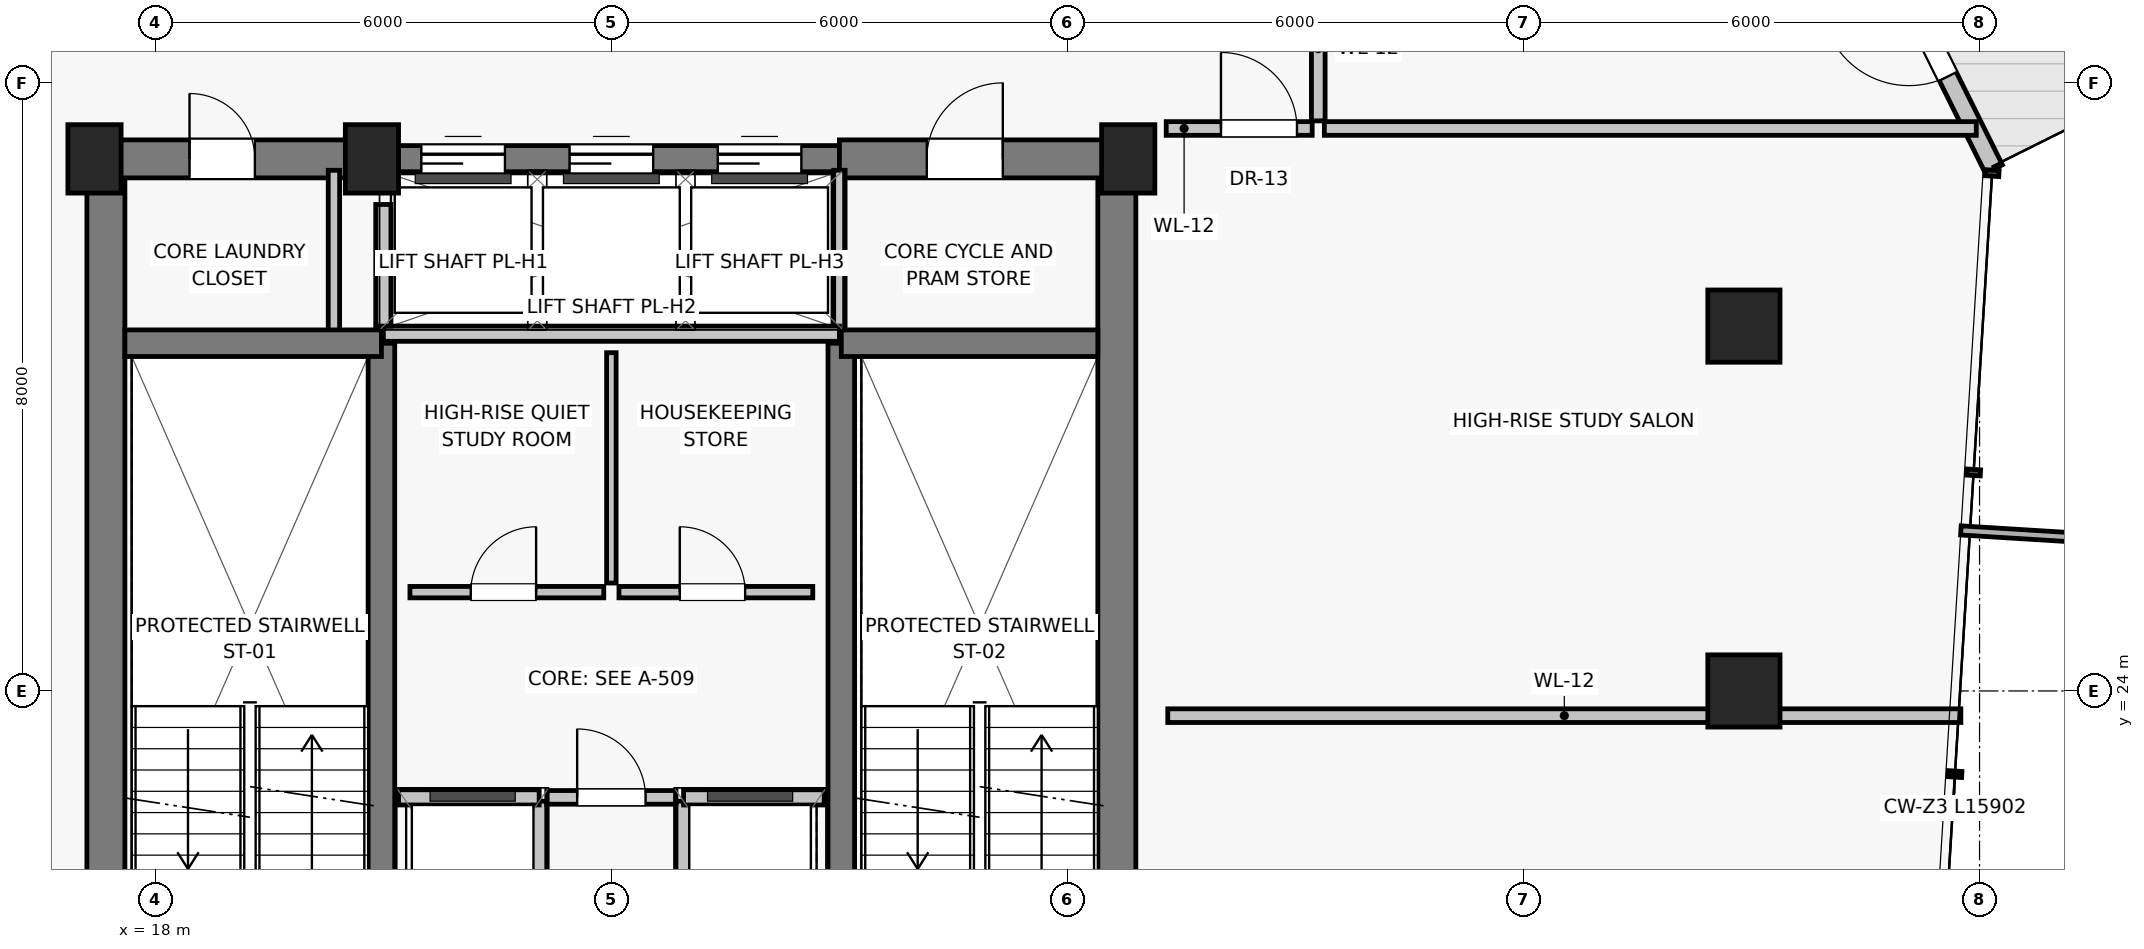
"""IFC4 building model, lengths in metres.
Left out: names, types, materials, properties, quantities, classifications, styles, units other than length and angle.
Written with IfcOpenShell. Run it as: python <this file> out.ifc"""

import sys

from ifc_helpers import new_model, si_unit, direction, frame, frame_2d, origin, origin_2d, place, context, subcontext, project, spatial, rectangle, extrude, source, transform, mapped, element, fill, save


model = new_model("IFC4")
c1 = context("Model", 3, precision=1e-05, world=origin(), true_north=direction((0.0, 1.0)))
c2 = subcontext(c1, "Body", "Model", "MODEL_VIEW")
j1 = project(units=[si_unit("LENGTHUNIT", "METRE"), si_unit("PLANEANGLEUNIT", "RADIAN")], contexts=[c1])
p1 = place(None, origin())
s1 = spatial("IfcSite", under=j1, at=p1, CompositionType="ELEMENT")
p2 = place(p1, origin())
s2 = spatial("IfcBuilding", under=s1, at=p2, CompositionType="ELEMENT")
p3 = place(p2, frame((0.0, 0.0, 218.9)))
s3 = spatial("IfcBuildingStorey", under=s2, at=p3, CompositionType="ELEMENT", Elevation=218.9)
for number, where, z_axis, x_axis in (
    (1, (17.2, 31.0, 0.0), (0.0, 0.0, 1.0), (1.0, 0.0, 0.0)),
    (2, (20.85, 31.0, 0.0), (0.0, 0.0, 1.0), (1.0, 0.0, 0.0)),
    (3, (30.8, 31.0, 0.0), (0.0, 0.0, 1.0), (1.0, 0.0, 0.0)),
):
    element("IfcColumn", number, at=place(p3, frame(where, z_axis=z_axis, x_axis=x_axis)), inside=s3, PredefinedType="PILASTER", context=c2, shape_type="SweptSolid", body=[
        extrude(rectangle(XDim=0.7, YDim=0.9, at=origin_2d()), origin(), (0.0, 0.0, 1.0), 3.25),
    ])
for number, where, z_axis, x_axis in (
    (4, (38.9, 24.0, 0.0), (0.0, 0.0, 1.0), (1.0, 0.0, 0.0)),
    (5, (38.9, 28.8, 0.0), (0.0, 0.0, 1.0), (1.0, 0.0, 0.0)),
):
    element("IfcColumn", number, at=place(p3, frame(where, z_axis=z_axis, x_axis=x_axis)), inside=s3, PredefinedType="COLUMN", context=c2, shape_type="SweptSolid", body=[
        extrude(rectangle(XDim=0.95, YDim=0.95, at=origin_2d()), origin(), (0.0, 0.0, 1.0), 3.25),
    ])
p4 = place(p3, frame((42.189, 30.867, 0.0), z_axis=(0.0, 0.0, 1.0), x_axis=(-0.445591168043, 0.895236567038, 0.0)))
e6 = element("IfcWall", 6, at=p4, inside=s3, PredefinedType="SOLIDWALL", context=c2, shape_type="SweptSolid", body=[
    extrude(rectangle(XDim=3.914, YDim=0.25, at=frame_2d((1.957, 0.0))), origin(), (0.0, 0.0, 1.0), 3.015),
])
p5 = place(p4, frame((1.36, 0.0, 0.0)))
e7 = element("IfcOpeningElement", 7, at=p5, cuts=e6, PredefinedType="OPENING", context=c2, shape_type="SweptSolid", body=[
    extrude(rectangle(XDim=1.15, YDim=2.25, at=frame_2d((0.575, 1.125))), frame((0.0, 0.135, 0.0), z_axis=(0.0, -1.0, 0.0), x_axis=(1.0, 0.0, 0.0)), (0.0, 0.0, 1.0), 0.27),
])
for number, where, z_axis, x_axis in (
    (8, (17.35, 16.8, 0.0), (0.0, 0.0, 1.0), (0.0, 1.0, 0.0)),
    (9, (30.65, 16.8, 0.0), (0.0, 0.0, 1.0), (0.0, 1.0, 0.0)),
):
    element("IfcWall", number, at=place(p3, frame(where, z_axis=z_axis, x_axis=x_axis)), inside=s3, PredefinedType="SHEAR", context=c2, shape_type="SweptSolid", body=[
        extrude(rectangle(XDim=14.2, YDim=0.5, at=frame_2d((7.1, 0.0))), origin(), (0.0, 0.0, 1.0), 3.015),
    ])
p6 = place(p3, frame((17.2, 31.0, 0.0), z_axis=(0.0, 0.0, 1.0), x_axis=(1.0, 0.0, 0.0)))
e10 = element("IfcWall", 10, at=p6, inside=s3, PredefinedType="SHEAR", context=c2, shape_type="SweptSolid", body=[
    extrude(rectangle(XDim=3.8, YDim=0.5, at=frame_2d((1.9, 0.0))), origin(), (0.0, 0.0, 1.0), 3.015),
])
p7 = place(p6, frame((1.25, 0.0, 0.0)))
e11 = element("IfcOpeningElement", 11, at=p7, cuts=e10, PredefinedType="OPENING", context=c2, shape_type="SweptSolid", body=[
    extrude(rectangle(XDim=0.86, YDim=2.01, at=frame_2d((0.43, 1.005))), frame((0.0, 0.26, 0.0), z_axis=(0.0, -1.0, 0.0), x_axis=(1.0, 0.0, 0.0)), (0.0, 0.0, 1.0), 0.52),
])
p8 = place(p3, frame((21.0, 31.0, 0.0), z_axis=(0.0, 0.0, 1.0), x_axis=(1.0, 0.0, 0.0)))
e12 = element("IfcWall", 12, at=p8, inside=s3, PredefinedType="SHEAR", context=c2, shape_type="SweptSolid", body=[
    extrude(rectangle(XDim=6.0, YDim=0.35, at=frame_2d((3.0, 0.0))), origin(), (0.0, 0.0, 1.0), 3.015),
])
p9 = place(p8, frame((0.5, 0.0, 0.0)))
e13 = element("IfcOpeningElement", 13, at=p9, cuts=e12, PredefinedType="OPENING", context=c2, shape_type="SweptSolid", body=[
    extrude(rectangle(XDim=1.1, YDim=2.08, at=frame_2d((0.55, 1.04))), frame((0.0, 0.185, 0.0), z_axis=(0.0, -1.0, 0.0), x_axis=(1.0, 0.0, 0.0)), (0.0, 0.0, 1.0), 0.37),
])
p10 = place(p8, frame((2.45, 0.0, 0.0)))
e14 = element("IfcOpeningElement", 14, at=p10, cuts=e12, PredefinedType="OPENING", context=c2, shape_type="SweptSolid", body=[
    extrude(rectangle(XDim=1.1, YDim=2.08, at=frame_2d((0.55, 1.04))), frame((0.0, 0.185, 0.0), z_axis=(0.0, -1.0, 0.0), x_axis=(1.0, 0.0, 0.0)), (0.0, 0.0, 1.0), 0.37),
])
p11 = place(p8, frame((4.4, 0.0, 0.0)))
e15 = element("IfcOpeningElement", 15, at=p11, cuts=e12, PredefinedType="OPENING", context=c2, shape_type="SweptSolid", body=[
    extrude(rectangle(XDim=1.1, YDim=2.08, at=frame_2d((0.55, 1.04))), frame((0.0, 0.185, 0.0), z_axis=(0.0, -1.0, 0.0), x_axis=(1.0, 0.0, 0.0)), (0.0, 0.0, 1.0), 0.37),
])
p12 = place(p3, frame((27.0, 31.0, 0.0), z_axis=(0.0, 0.0, 1.0), x_axis=(1.0, 0.0, 0.0)))
e16 = element("IfcWall", 16, at=p12, inside=s3, PredefinedType="SHEAR", context=c2, shape_type="SweptSolid", body=[
    extrude(rectangle(XDim=3.8, YDim=0.5, at=frame_2d((1.9, 0.0))), origin(), (0.0, 0.0, 1.0), 3.015),
])
p13 = place(p12, frame((1.15, 0.0, 0.0)))
e17 = element("IfcOpeningElement", 17, at=p13, cuts=e16, PredefinedType="OPENING", context=c2, shape_type="SweptSolid", body=[
    extrude(rectangle(XDim=1.0, YDim=2.01, at=frame_2d((0.5, 1.005))), frame((0.0, 0.26, 0.0), z_axis=(0.0, -1.0, 0.0), x_axis=(1.0, 0.0, 0.0)), (0.0, 0.0, 1.0), 0.52),
])
for number, where, z_axis, x_axis in (
    (18, (20.35, 28.65, 0.0), (0.0, 0.0, 1.0), (0.0, 1.0, 0.0)),
    (19, (27.0, 28.65, 0.0), (0.0, 0.0, 1.0), (0.0, 1.0, 0.0)),
):
    element("IfcWall", number, at=place(p3, frame(where, z_axis=z_axis, x_axis=x_axis)), inside=s3, PredefinedType="PARTITIONING", context=c2, shape_type="SweptSolid", body=[
        extrude(rectangle(XDim=2.2, YDim=0.15, at=frame_2d((1.1, 0.0))), origin(), (0.0, 0.0, 1.0), 3.015),
    ])
for number, where, z_axis, x_axis in (
    (20, (20.975, 19.8, 0.0), (0.0, 0.0, 1.0), (0.0, 1.0, 0.0)),
    (21, (27.025, 19.8, 0.0), (0.0, 0.0, 1.0), (0.0, 1.0, 0.0)),
):
    element("IfcWall", number, at=place(p3, frame(where, z_axis=z_axis, x_axis=x_axis)), inside=s3, PredefinedType="SHEAR", context=c2, shape_type="SweptSolid", body=[
        extrude(rectangle(XDim=8.775, YDim=0.35, at=frame_2d((4.387, 0.0))), origin(), (0.0, 0.0, 1.0), 3.015),
    ])
for number, where, z_axis, x_axis in (
    (22, (17.6, 28.575, 0.0), (0.0, 0.0, 1.0), (1.0, 0.0, 0.0)),
    (23, (27.025, 28.575, 0.0), (0.0, 0.0, 1.0), (1.0, 0.0, 0.0)),
):
    element("IfcWall", number, at=place(p3, frame(where, z_axis=z_axis, x_axis=x_axis)), inside=s3, PredefinedType="SHEAR", context=c2, shape_type="SweptSolid", body=[
        extrude(rectangle(XDim=3.375, YDim=0.35, at=frame_2d((1.688, 0.0))), origin(), (0.0, 0.0, 1.0), 3.015),
    ])
for number, where, z_axis, x_axis in (
    (24, (23.05, 16.95, 0.0), (0.0, 0.0, 1.0), (0.0, 1.0, 0.0)),
    (25, (24.95, 16.95, 0.0), (0.0, 0.0, 1.0), (0.0, 1.0, 0.0)),
):
    element("IfcWall", number, at=place(p3, frame(where, z_axis=z_axis, x_axis=x_axis)), inside=s3, PredefinedType="SOLIDWALL", context=c2, shape_type="SweptSolid", body=[
        extrude(rectangle(XDim=5.6, YDim=0.2, at=frame_2d((2.8, 0.0))), origin(), (0.0, 0.0, 1.0), 3.015),
    ])
for number, where, z_axis, x_axis in (
    (26, (21.2, 22.6, 0.0), (0.0, 0.0, 1.0), (1.0, 0.0, 0.0)),
    (27, (24.95, 22.6, 0.0), (0.0, 0.0, 1.0), (1.0, 0.0, 0.0)),
):
    element("IfcWall", number, at=place(p3, frame(where, z_axis=z_axis, x_axis=x_axis)), inside=s3, PredefinedType="SOLIDWALL", context=c2, shape_type="SweptSolid", body=[
        extrude(rectangle(XDim=1.85, YDim=0.2, at=frame_2d((0.925, 0.0))), origin(), (0.0, 0.0, 1.0), 3.015),
    ])
p14 = place(p3, frame((21.0, 28.7, 0.0), z_axis=(0.0, 0.0, 1.0), x_axis=(1.0, 0.0, 0.0)))
e28 = element("IfcWall", 28, at=p14, inside=s3, PredefinedType="SOLIDWALL", context=c2, shape_type="SweptSolid", body=[
    extrude(rectangle(XDim=6.0, YDim=0.2, at=frame_2d((3.0, 0.0))), origin(), (0.0, 0.0, 1.0), 3.015),
])
p15 = place(p3, frame((21.0, 28.8, 0.0), z_axis=(0.0, 0.0, 1.0), x_axis=(0.0, 1.0, 0.0)))
e29 = element("IfcWall", 29, at=p15, inside=s3, PredefinedType="SOLIDWALL", context=c2, shape_type="SweptSolid", body=[
    extrude(rectangle(XDim=1.6, YDim=0.2, at=frame_2d((0.8, 0.0))), origin(), (0.0, 0.0, 1.0), 3.015),
])
p16 = place(p3, frame((23.15, 22.6, 0.0), z_axis=(0.0, 0.0, 1.0), x_axis=(1.0, 0.0, 0.0)))
e30 = element("IfcWall", 30, at=p16, inside=s3, PredefinedType="PARTITIONING", context=c2, shape_type="SweptSolid", body=[
    extrude(rectangle(XDim=1.7, YDim=0.18, at=frame_2d((0.85, 0.0))), origin(), (0.0, 0.0, 1.0), 3.015),
])
p17 = place(p16, frame((0.4, 0.0, 0.0)))
e31 = element("IfcOpeningElement", 31, at=p17, cuts=e30, PredefinedType="OPENING", context=c2, shape_type="SweptSolid", body=[
    extrude(rectangle(XDim=0.9, YDim=2.01, at=frame_2d((0.45, 1.005))), frame((0.0, 0.1, 0.0), z_axis=(0.0, -1.0, 0.0), x_axis=(1.0, 0.0, 0.0)), (0.0, 0.0, 1.0), 0.2),
])
p18 = place(p3, frame((21.35, 25.3, 0.0), z_axis=(0.0, 0.0, 1.0), x_axis=(1.0, 0.0, 0.0)))
e32 = element("IfcWall", 32, at=p18, inside=s3, PredefinedType="PARTITIONING", context=c2, shape_type="SweptSolid", body=[
    extrude(rectangle(XDim=2.55, YDim=0.15, at=frame_2d((1.275, 0.0))), origin(), (0.0, 0.0, 1.0), 3.015),
])
p19 = place(p18, frame((0.8, 0.0, 0.0)))
e33 = element("IfcOpeningElement", 33, at=p19, cuts=e32, PredefinedType="OPENING", context=c2, shape_type="SweptSolid", body=[
    extrude(rectangle(XDim=0.86, YDim=2.01, at=frame_2d((0.43, 1.005))), frame((0.0, 0.085, 0.0), z_axis=(0.0, -1.0, 0.0), x_axis=(1.0, 0.0, 0.0)), (0.0, 0.0, 1.0), 0.17),
])
p20 = place(p3, frame((24.1, 25.3, 0.0), z_axis=(0.0, 0.0, 1.0), x_axis=(1.0, 0.0, 0.0)))
e34 = element("IfcWall", 34, at=p20, inside=s3, PredefinedType="PARTITIONING", context=c2, shape_type="SweptSolid", body=[
    extrude(rectangle(XDim=2.55, YDim=0.15, at=frame_2d((1.275, 0.0))), origin(), (0.0, 0.0, 1.0), 3.015),
])
p21 = place(p20, frame((0.8, 0.0, 0.0)))
e35 = element("IfcOpeningElement", 35, at=p21, cuts=e34, PredefinedType="OPENING", context=c2, shape_type="SweptSolid", body=[
    extrude(rectangle(XDim=0.86, YDim=2.01, at=frame_2d((0.43, 1.005))), frame((0.0, 0.085, 0.0), z_axis=(0.0, -1.0, 0.0), x_axis=(1.0, 0.0, 0.0)), (0.0, 0.0, 1.0), 0.17),
])
p22 = place(p3, frame((24.0, 25.42, 0.0), z_axis=(0.0, 0.0, 1.0), x_axis=(0.0, 1.0, 0.0)))
e36 = element("IfcWall", 36, at=p22, inside=s3, PredefinedType="PARTITIONING", context=c2, shape_type="SweptSolid", body=[
    extrude(rectangle(XDim=3.03, YDim=0.125, at=frame_2d((1.515, 0.0))), origin(), (0.0, 0.0, 1.0), 3.015),
])
p23 = place(p3, frame((31.32, 23.675, 0.0), z_axis=(0.0, 0.0, 1.0), x_axis=(1.0, 0.0, 0.0)))
e37 = element("IfcWall", 37, at=p23, inside=s3, PredefinedType="PARTITIONING", context=c2, shape_type="SweptSolid", body=[
    extrude(rectangle(XDim=10.434, YDim=0.18, at=frame_2d((5.217, 0.0))), origin(), (0.0, 0.0, 1.0), 3.015),
])
p24 = place(p3, frame((33.3, 31.5, 0.0), z_axis=(0.0, 0.0, 1.0), x_axis=(0.0, 1.0, 0.0)))
e38 = element("IfcWall", 38, at=p24, inside=s3, PredefinedType="PARTITIONING", context=c2, shape_type="SweptSolid", body=[
    extrude(rectangle(XDim=1.9, YDim=0.18, at=frame_2d((0.95, 0.0))), origin(), (0.0, 0.0, 1.0), 3.015),
])
p25 = place(p3, frame((31.3, 31.4, 0.0), z_axis=(0.0, 0.0, 1.0), x_axis=(1.0, 0.0, 0.0)))
e39 = element("IfcWall", 39, at=p25, inside=s3, PredefinedType="PARTITIONING", context=c2, shape_type="SweptSolid", body=[
    extrude(rectangle(XDim=1.92, YDim=0.18, at=frame_2d((0.96, 0.0))), origin(), (0.0, 0.0, 1.0), 3.015),
])
p26 = place(p25, frame((0.72, 0.0, 0.0)))
e40 = element("IfcOpeningElement", 40, at=p26, cuts=e39, PredefinedType="OPENING", context=c2, shape_type="SweptSolid", body=[
    extrude(rectangle(XDim=1.0, YDim=2.01, at=frame_2d((0.5, 1.005))), frame((0.0, 0.1, 0.0), z_axis=(0.0, -1.0, 0.0), x_axis=(1.0, 0.0, 0.0)), (0.0, 0.0, 1.0), 0.2),
])
p27 = place(p3, frame((33.38, 31.4, 0.0), z_axis=(0.0, 0.0, 1.0), x_axis=(1.0, 0.0, 0.0)))
e41 = element("IfcWall", 41, at=p27, inside=s3, PredefinedType="PARTITIONING", context=c2, shape_type="SweptSolid", body=[
    extrude(rectangle(XDim=8.577, YDim=0.18, at=frame_2d((4.289, 0.0))), origin(), (0.0, 0.0, 1.0), 3.015),
])
m1 = source(origin(), c2, "Body", "SweptSolid", [
    extrude(rectangle(XDim=1.15, YDim=2.25, at=frame_2d((0.575, 1.125))), frame((0.0, 0.025, 0.0), z_axis=(0.0, -1.0, 0.0), x_axis=(1.0, 0.0, 0.0)), (0.0, 0.0, 1.0), 0.05),
])
p28 = place(p5, frame((1.15, 0.0, 0.0), z_axis=(0.0, 0.0, 1.0), x_axis=(-1.0, 0.0, 0.0)))
e42 = element("IfcDoor", 42, at=p28, inside=s3, OperationType="SINGLE_SWING_RIGHT", PredefinedType="DOOR", context=c2, shape_type="MappedRepresentation", body=[
    mapped(m1, transform((0.0, 0.0, 0.0), scale=1.0)),
])
fill(e7, e42)
m2 = source(origin(), c2, "Body", "SweptSolid", [
    extrude(rectangle(XDim=0.86, YDim=2.01, at=frame_2d((0.43, 1.005))), frame((0.0, 0.025, 0.0), z_axis=(0.0, -1.0, 0.0), x_axis=(1.0, 0.0, 0.0)), (0.0, 0.0, 1.0), 0.05),
])
p29 = place(p7, origin())
e43 = element("IfcDoor", 43, at=p29, inside=s3, OperationType="SINGLE_SWING_LEFT", PredefinedType="DOOR", context=c2, shape_type="MappedRepresentation", body=[
    mapped(m2, transform((0.0, 0.0, 0.0), scale=1.0)),
])
fill(e11, e43)
m3 = source(origin(), c2, "Body", "SweptSolid", [
    extrude(rectangle(XDim=1.1, YDim=2.08, at=frame_2d((0.55, 1.04))), frame((0.0, 0.025, 0.0), z_axis=(0.0, -1.0, 0.0), x_axis=(1.0, 0.0, 0.0)), (0.0, 0.0, 1.0), 0.05),
])
p30 = place(p9, origin())
e44 = element("IfcDoor", 44, at=p30, inside=s3, OperationType="SLIDING_TO_LEFT", PredefinedType="DOOR", context=c2, shape_type="MappedRepresentation", body=[
    mapped(m3, transform((0.0, 0.0, 0.0), scale=1.0)),
])
fill(e13, e44)
p31 = place(p10, origin())
e45 = element("IfcDoor", 45, at=p31, inside=s3, OperationType="SLIDING_TO_LEFT", PredefinedType="DOOR", context=c2, shape_type="MappedRepresentation", body=[
    mapped(m3, transform((0.0, 0.0, 0.0), scale=1.0)),
])
fill(e14, e45)
p32 = place(p11, origin())
e46 = element("IfcDoor", 46, at=p32, inside=s3, OperationType="SLIDING_TO_LEFT", PredefinedType="DOOR", context=c2, shape_type="MappedRepresentation", body=[
    mapped(m3, transform((0.0, 0.0, 0.0), scale=1.0)),
])
fill(e15, e46)
m4 = source(origin(), c2, "Body", "SweptSolid", [
    extrude(rectangle(XDim=1.0, YDim=2.01, at=frame_2d((0.5, 1.005))), frame((0.0, 0.025, 0.0), z_axis=(0.0, -1.0, 0.0), x_axis=(1.0, 0.0, 0.0)), (0.0, 0.0, 1.0), 0.05),
])
p33 = place(p13, origin())
e47 = element("IfcDoor", 47, at=p33, inside=s3, OperationType="SINGLE_SWING_RIGHT", PredefinedType="DOOR", context=c2, shape_type="MappedRepresentation", body=[
    mapped(m4, transform((0.0, 0.0, 0.0), scale=1.0)),
])
fill(e17, e47)
m5 = source(origin(), c2, "Body", "SweptSolid", [
    extrude(rectangle(XDim=0.9, YDim=2.01, at=frame_2d((0.45, 1.005))), frame((0.0, 0.025, 0.0), z_axis=(0.0, -1.0, 0.0), x_axis=(1.0, 0.0, 0.0)), (0.0, 0.0, 1.0), 0.05),
])
p34 = place(p17, origin())
e48 = element("IfcDoor", 48, at=p34, inside=s3, OperationType="SINGLE_SWING_LEFT", PredefinedType="DOOR", context=c2, shape_type="MappedRepresentation", body=[
    mapped(m5, transform((0.0, 0.0, 0.0), scale=1.0)),
])
fill(e31, e48)
p35 = place(p19, origin())
e49 = element("IfcDoor", 49, at=p35, inside=s3, OperationType="SINGLE_SWING_RIGHT", PredefinedType="DOOR", context=c2, shape_type="MappedRepresentation", body=[
    mapped(m2, transform((0.0, 0.0, 0.0), scale=1.0)),
])
fill(e33, e49)
p36 = place(p21, origin())
e50 = element("IfcDoor", 50, at=p36, inside=s3, OperationType="SINGLE_SWING_LEFT", PredefinedType="DOOR", context=c2, shape_type="MappedRepresentation", body=[
    mapped(m2, transform((0.0, 0.0, 0.0), scale=1.0)),
])
fill(e35, e50)
p37 = place(p26, origin())
e51 = element("IfcDoor", 51, at=p37, inside=s3, OperationType="SINGLE_SWING_LEFT", PredefinedType="DOOR", context=c2, shape_type="MappedRepresentation", body=[
    mapped(m4, transform((0.0, 0.0, 0.0), scale=1.0)),
])
fill(e40, e51)
save(model, sys.argv[1])
